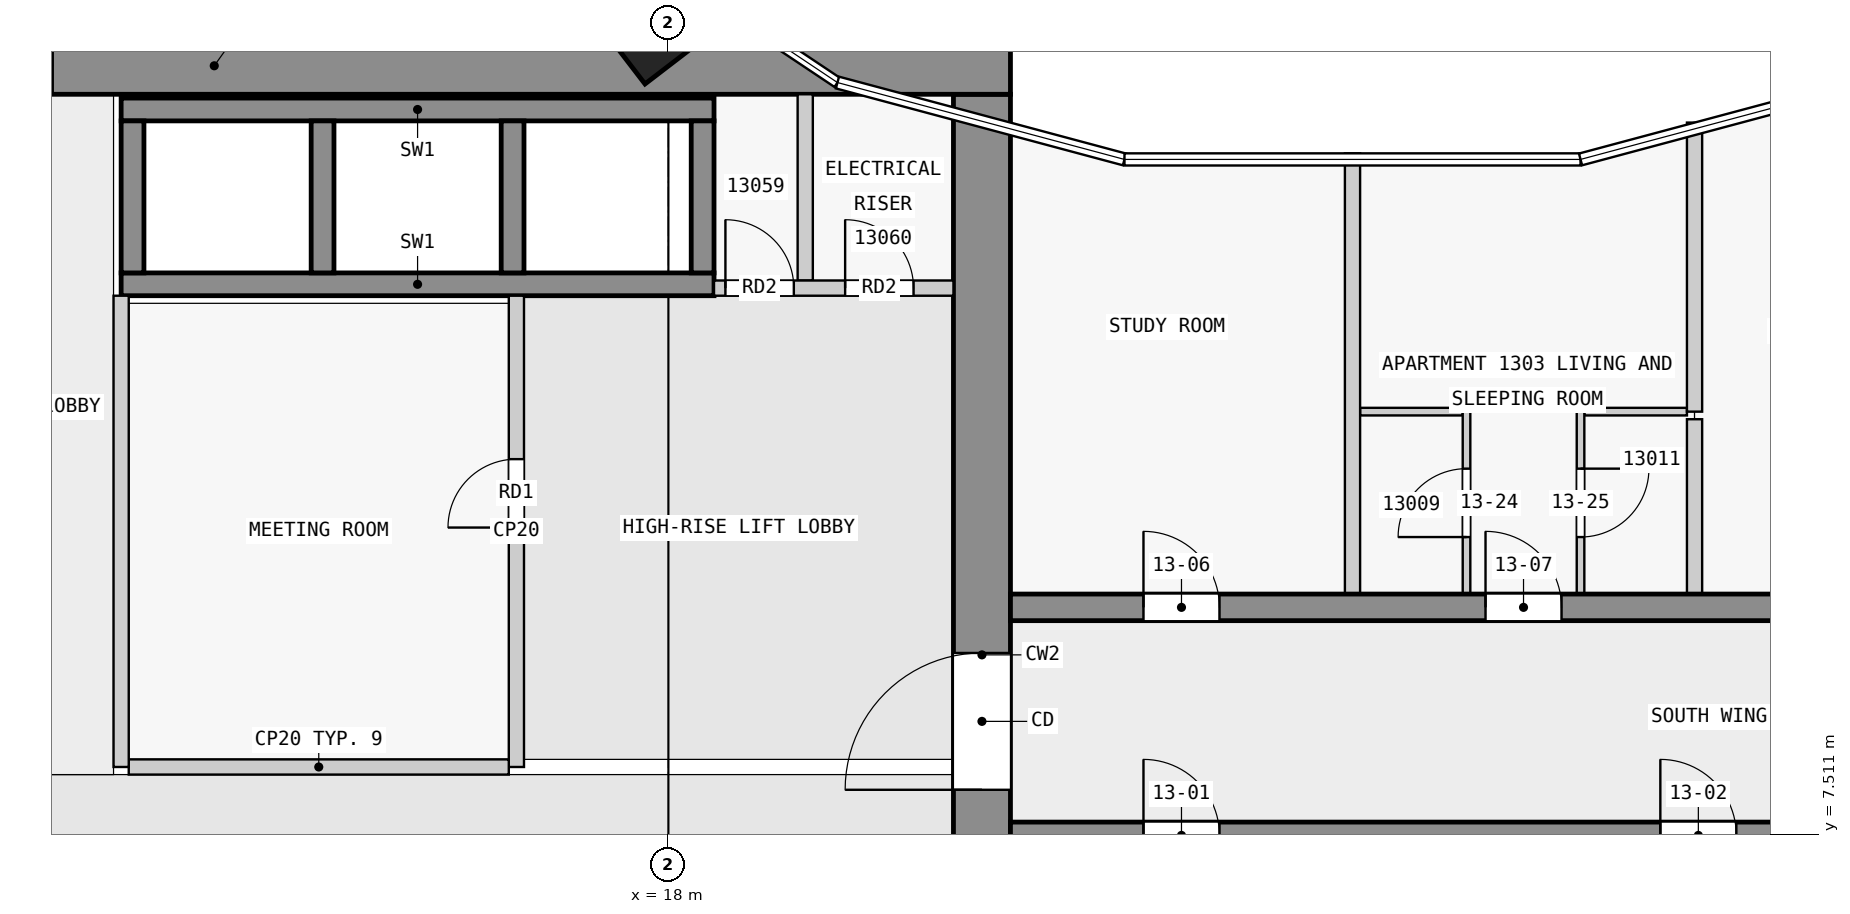
"""IFC4 building model, lengths in metres.
Left out: names, types, materials, properties, quantities, classifications, styles, units other than length and angle.
Written with IfcOpenShell. Run it as: python <this file> out.ifc"""

import sys

from ifc_helpers import new_model, si_unit, direction, frame, frame_2d, origin, origin_2d, place, context, subcontext, project, spatial, rectangle, extrude, element, fill, save


model = new_model("IFC4")
c1 = context("Model", 3, precision=1e-05, world=origin(), true_north=direction((0.0, 1.0)))
c2 = subcontext(c1, "Body", "Model", "MODEL_VIEW")
j1 = project(units=[si_unit("LENGTHUNIT", "METRE"), si_unit("PLANEANGLEUNIT", "RADIAN")], contexts=[c1])
p1 = place(None, origin())
s1 = spatial("IfcSite", under=j1, at=p1, CompositionType="ELEMENT")
p2 = place(p1, origin())
s2 = spatial("IfcBuilding", under=s1, at=p2, CompositionType="ELEMENT")
p3 = place(p2, frame((0.0, 0.0, 54.8)))
s3 = spatial("IfcBuildingStorey", under=s2, at=p3, CompositionType="ELEMENT", Elevation=54.8)
p4 = place(p3, frame((18.065, 18.05, 0.0), z_axis=(0.0, 0.0, 1.0), x_axis=(-0.608810846443, 0.793315418515, 0.0)))
e1 = element("IfcColumn", 1, at=p4, inside=s3, PredefinedType="COLUMN", context=c2, shape_type="SweptSolid", body=[
    extrude(rectangle(XDim=0.6, YDim=1.4, at=origin_2d()), origin(), (0.0, 0.0, 1.0), 3.5),
])
p5 = place(p3, frame((1.55, 17.625, 0.0), z_axis=(0.0, 0.0, 1.0), x_axis=(1.0, 0.0, 0.0)))
e2 = element("IfcWall", 2, at=p5, inside=s3, PredefinedType="SHEAR", context=c2, shape_type="SweptSolid", body=[
    extrude(rectangle(XDim=20.95, YDim=0.75, at=frame_2d((10.475, 0.0))), origin(), (0.0, 0.0, 1.0), 3.25),
])
p6 = place(p5, frame((6.55, 0.0, 0.0)))
e3 = element("IfcOpeningElement", 3, at=p6, cuts=e2, PredefinedType="OPENING", context=c2, shape_type="SweptSolid", body=[
    extrude(rectangle(XDim=1.8, YDim=2.1, at=frame_2d((0.9, 1.05))), frame((0.0, 0.385, 0.0), z_axis=(0.0, -1.0, 0.0), x_axis=(1.0, 0.0, 0.0)), (0.0, 0.0, 1.0), 0.77),
])
p7 = place(p3, frame((22.125, 2.5, 0.0), z_axis=(0.0, 0.0, 1.0), x_axis=(0.0, 1.0, 0.0)))
e4 = element("IfcWall", 4, at=p7, inside=s3, PredefinedType="SHEAR", context=c2, shape_type="SweptSolid", body=[
    extrude(rectangle(XDim=14.75, YDim=0.75, at=frame_2d((7.375, 0.0))), origin(), (0.0, 0.0, 1.0), 3.25),
])
p8 = place(p7, frame((5.6, 0.0, 0.0)))
e5 = element("IfcOpeningElement", 5, at=p8, cuts=e4, PredefinedType="OPENING", context=c2, shape_type="SweptSolid", body=[
    extrude(rectangle(XDim=1.8, YDim=2.1, at=frame_2d((0.9, 1.05))), frame((0.0, 0.385, 0.0), z_axis=(0.0, -1.0, 0.0), x_axis=(1.0, 0.0, 0.0)), (0.0, 0.0, 1.0), 0.77),
])
for number, where, z_axis, x_axis in (
    (6, (10.8, 17.05, 0.0), (0.0, 0.0, 1.0), (1.0, 0.0, 0.0)),
    (7, (10.8, 14.75, 0.0), (0.0, 0.0, 1.0), (1.0, 0.0, 0.0)),
):
    element("IfcWall", number, at=place(p3, frame(where, z_axis=z_axis, x_axis=x_axis)), inside=s3, PredefinedType="SHEAR", context=c2, shape_type="SweptSolid", body=[
        extrude(rectangle(XDim=7.8, YDim=0.3, at=frame_2d((3.9, 0.0))), origin(), (0.0, 0.0, 1.0), 3.25),
    ])
for number, where, z_axis, x_axis in (
    (8, (10.95, 14.9, 0.0), (0.0, 0.0, 1.0), (0.0, 1.0, 0.0)),
    (9, (13.45, 14.9, 0.0), (0.0, 0.0, 1.0), (0.0, 1.0, 0.0)),
    (10, (15.95, 14.9, 0.0), (0.0, 0.0, 1.0), (0.0, 1.0, 0.0)),
    (11, (18.45, 14.9, 0.0), (0.0, 0.0, 1.0), (0.0, 1.0, 0.0)),
):
    element("IfcWall", number, at=place(p3, frame(where, z_axis=z_axis, x_axis=x_axis)), inside=s3, PredefinedType="SHEAR", context=c2, shape_type="SweptSolid", body=[
        extrude(rectangle(XDim=2.0, YDim=0.3, at=frame_2d((1.0, 0.0))), origin(), (0.0, 0.0, 1.0), 3.25),
    ])
p9 = place(p3, frame((22.5, 7.5, 0.0), z_axis=(0.0, 0.0, 1.0), x_axis=(1.0, 0.0, 0.0)))
e12 = element("IfcWall", 12, at=p9, inside=s3, PredefinedType="SHEAR", context=c2, shape_type="SweptSolid", body=[
    extrude(rectangle(XDim=22.5, YDim=0.35, at=frame_2d((11.25, 0.0))), origin(), (0.0, 0.0, 1.0), 3.25),
])
p10 = place(p9, frame((1.75, 0.0, 0.0)))
e13 = element("IfcOpeningElement", 13, at=p10, cuts=e12, PredefinedType="OPENING", context=c2, shape_type="SweptSolid", body=[
    extrude(rectangle(XDim=1.0, YDim=2.1, at=frame_2d((0.5, 1.05))), frame((0.0, 0.185, 0.0), z_axis=(0.0, -1.0, 0.0), x_axis=(1.0, 0.0, 0.0)), (0.0, 0.0, 1.0), 0.37),
])
p11 = place(p9, frame((8.55, 0.0, 0.0)))
e14 = element("IfcOpeningElement", 14, at=p11, cuts=e12, PredefinedType="OPENING", context=c2, shape_type="SweptSolid", body=[
    extrude(rectangle(XDim=1.0, YDim=2.1, at=frame_2d((0.5, 1.05))), frame((0.0, 0.185, 0.0), z_axis=(0.0, -1.0, 0.0), x_axis=(1.0, 0.0, 0.0)), (0.0, 0.0, 1.0), 0.37),
])
p12 = place(p9, frame((15.25, 0.0, 0.0)))
e15 = element("IfcOpeningElement", 15, at=p12, cuts=e12, PredefinedType="OPENING", context=c2, shape_type="SweptSolid", body=[
    extrude(rectangle(XDim=1.0, YDim=2.1, at=frame_2d((0.5, 1.05))), frame((0.0, 0.185, 0.0), z_axis=(0.0, -1.0, 0.0), x_axis=(1.0, 0.0, 0.0)), (0.0, 0.0, 1.0), 0.37),
])
p13 = place(p9, frame((18.75, 0.0, 0.0)))
e16 = element("IfcOpeningElement", 16, at=p13, cuts=e12, PredefinedType="OPENING", context=c2, shape_type="SweptSolid", body=[
    extrude(rectangle(XDim=0.9, YDim=2.1, at=frame_2d((0.45, 1.05))), frame((0.0, 0.185, 0.0), z_axis=(0.0, -1.0, 0.0), x_axis=(1.0, 0.0, 0.0)), (0.0, 0.0, 1.0), 0.37),
])
p14 = place(p9, frame((20.95, 0.0, 0.0)))
e17 = element("IfcOpeningElement", 17, at=p14, cuts=e12, PredefinedType="OPENING", context=c2, shape_type="SweptSolid", body=[
    extrude(rectangle(XDim=1.0, YDim=2.1, at=frame_2d((0.5, 1.05))), frame((0.0, 0.185, 0.0), z_axis=(0.0, -1.0, 0.0), x_axis=(1.0, 0.0, 0.0)), (0.0, 0.0, 1.0), 0.37),
])
p15 = place(p3, frame((22.5, 10.5, 0.0), z_axis=(0.0, 0.0, 1.0), x_axis=(1.0, 0.0, 0.0)))
e18 = element("IfcWall", 18, at=p15, inside=s3, PredefinedType="SHEAR", context=c2, shape_type="SweptSolid", body=[
    extrude(rectangle(XDim=22.5, YDim=0.35, at=frame_2d((11.25, 0.0))), origin(), (0.0, 0.0, 1.0), 3.25),
])
p16 = place(p15, frame((1.75, 0.0, 0.0)))
e19 = element("IfcOpeningElement", 19, at=p16, cuts=e18, PredefinedType="OPENING", context=c2, shape_type="SweptSolid", body=[
    extrude(rectangle(XDim=1.0, YDim=2.1, at=frame_2d((0.5, 1.05))), frame((0.0, 0.185, 0.0), z_axis=(0.0, -1.0, 0.0), x_axis=(1.0, 0.0, 0.0)), (0.0, 0.0, 1.0), 0.37),
])
p17 = place(p15, frame((6.25, 0.0, 0.0)))
e20 = element("IfcOpeningElement", 20, at=p17, cuts=e18, PredefinedType="OPENING", context=c2, shape_type="SweptSolid", body=[
    extrude(rectangle(XDim=1.0, YDim=2.1, at=frame_2d((0.5, 1.05))), frame((0.0, 0.185, 0.0), z_axis=(0.0, -1.0, 0.0), x_axis=(1.0, 0.0, 0.0)), (0.0, 0.0, 1.0), 0.37),
])
p18 = place(p15, frame((10.75, 0.0, 0.0)))
e21 = element("IfcOpeningElement", 21, at=p18, cuts=e18, PredefinedType="OPENING", context=c2, shape_type="SweptSolid", body=[
    extrude(rectangle(XDim=1.0, YDim=2.1, at=frame_2d((0.5, 1.05))), frame((0.0, 0.185, 0.0), z_axis=(0.0, -1.0, 0.0), x_axis=(1.0, 0.0, 0.0)), (0.0, 0.0, 1.0), 0.37),
])
p19 = place(p15, frame((16.85, 0.0, 0.0)))
e22 = element("IfcOpeningElement", 22, at=p19, cuts=e18, PredefinedType="OPENING", context=c2, shape_type="SweptSolid", body=[
    extrude(rectangle(XDim=1.0, YDim=2.1, at=frame_2d((0.5, 1.05))), frame((0.0, 0.185, 0.0), z_axis=(0.0, -1.0, 0.0), x_axis=(1.0, 0.0, 0.0)), (0.0, 0.0, 1.0), 0.37),
])
p20 = place(p3, frame((10.8, 8.4, 0.0), z_axis=(0.0, 0.0, 1.0), x_axis=(0.0, 1.0, 0.0)))
e23 = element("IfcWall", 23, at=p20, inside=s3, PredefinedType="PARTITIONING", context=c2, shape_type="SweptSolid", body=[
    extrude(rectangle(XDim=6.2, YDim=0.2, at=frame_2d((3.1, 0.0))), origin(), (0.0, 0.0, 1.0), 3.25),
])
p21 = place(p3, frame((10.9, 8.4, 0.0), z_axis=(0.0, 0.0, 1.0), x_axis=(1.0, 0.0, 0.0)))
e24 = element("IfcWall", 24, at=p21, inside=s3, PredefinedType="PARTITIONING", context=c2, shape_type="SweptSolid", body=[
    extrude(rectangle(XDim=5.0, YDim=0.2, at=frame_2d((2.5, 0.0))), origin(), (0.0, 0.0, 1.0), 3.25),
])
p22 = place(p3, frame((16.0, 8.4, 0.0), z_axis=(0.0, 0.0, 1.0), x_axis=(0.0, 1.0, 0.0)))
e25 = element("IfcWall", 25, at=p22, inside=s3, PredefinedType="PARTITIONING", context=c2, shape_type="SweptSolid", body=[
    extrude(rectangle(XDim=6.2, YDim=0.2, at=frame_2d((3.1, 0.0))), origin(), (0.0, 0.0, 1.0), 3.25),
])
p23 = place(p22, frame((3.15, 0.0, 0.0)))
e26 = element("IfcOpeningElement", 26, at=p23, cuts=e25, PredefinedType="OPENING", context=c2, shape_type="SweptSolid", body=[
    extrude(rectangle(XDim=0.9, YDim=2.1, at=frame_2d((0.45, 1.05))), frame((0.0, 0.11, 0.0), z_axis=(0.0, -1.0, 0.0), x_axis=(1.0, 0.0, 0.0)), (0.0, 0.0, 1.0), 0.22),
])
p24 = place(p3, frame((18.6, 14.7, 0.0), z_axis=(0.0, 0.0, 1.0), x_axis=(1.0, 0.0, 0.0)))
e27 = element("IfcWall", 27, at=p24, inside=s3, PredefinedType="PARTITIONING", context=c2, shape_type="SweptSolid", body=[
    extrude(rectangle(XDim=3.15, YDim=0.2, at=frame_2d((1.575, 0.0))), origin(), (0.0, 0.0, 1.0), 3.25),
])
p25 = place(p24, frame((0.15, 0.0, 0.0)))
e28 = element("IfcOpeningElement", 28, at=p25, cuts=e27, PredefinedType="OPENING", context=c2, shape_type="SweptSolid", body=[
    extrude(rectangle(XDim=0.9, YDim=2.1, at=frame_2d((0.45, 1.05))), frame((0.0, 0.11, 0.0), z_axis=(0.0, -1.0, 0.0), x_axis=(1.0, 0.0, 0.0)), (0.0, 0.0, 1.0), 0.22),
])
p26 = place(p24, frame((1.725, 0.0, 0.0)))
e29 = element("IfcOpeningElement", 29, at=p26, cuts=e27, PredefinedType="OPENING", context=c2, shape_type="SweptSolid", body=[
    extrude(rectangle(XDim=0.9, YDim=2.1, at=frame_2d((0.45, 1.05))), frame((0.0, 0.11, 0.0), z_axis=(0.0, -1.0, 0.0), x_axis=(1.0, 0.0, 0.0)), (0.0, 0.0, 1.0), 0.22),
])
p27 = place(p3, frame((19.8, 14.8, 0.0), z_axis=(0.0, 0.0, 1.0), x_axis=(0.0, 1.0, 0.0)))
e30 = element("IfcWall", 30, at=p27, inside=s3, PredefinedType="PARTITIONING", context=c2, shape_type="SweptSolid", body=[
    extrude(rectangle(XDim=2.45, YDim=0.2, at=frame_2d((1.225, 0.0))), origin(), (0.0, 0.0, 1.0), 3.25),
])
for number, where, z_axis, x_axis in (
    (31, (28.45, 13.075, 0.0), (0.0, 0.0, 1.0), (-1.0, 0.0, 0.0)),
    (32, (31.4, 13.075, 0.0), (0.0, 0.0, 1.0), (-1.0, 0.0, 0.0)),
):
    element("IfcWall", number, at=place(p3, frame(where, z_axis=z_axis, x_axis=x_axis)), inside=s3, PredefinedType="PARTITIONING", context=c2, shape_type="SweptSolid", body=[
        extrude(rectangle(XDim=1.35, YDim=0.1, at=frame_2d((0.675, 0.0))), origin(), (0.0, 0.0, 1.0), 3.25),
    ])
p28 = place(p3, frame((27.0, 10.675, 0.0), z_axis=(0.0, 0.0, 1.0), x_axis=(0.0, 1.0, 0.0)))
e33 = element("IfcWall", 33, at=p28, inside=s3, PredefinedType="PARTITIONING", context=c2, shape_type="SweptSolid", body=[
    extrude(rectangle(XDim=5.798, YDim=0.2, at=frame_2d((2.899, 0.0))), origin(), (0.0, 0.0, 1.0), 3.25),
])
p29 = place(p3, frame((28.5, 10.675, 0.0), z_axis=(0.0, 0.0, 1.0), x_axis=(0.0, 1.0, 0.0)))
e34 = element("IfcWall", 34, at=p29, inside=s3, PredefinedType="PARTITIONING", context=c2, shape_type="SweptSolid", body=[
    extrude(rectangle(XDim=2.4, YDim=0.1, at=frame_2d((1.2, 0.0))), origin(), (0.0, 0.0, 1.0), 3.25),
])
p30 = place(p29, frame((0.75, 0.0, 0.0)))
e35 = element("IfcOpeningElement", 35, at=p30, cuts=e34, PredefinedType="OPENING", context=c2, shape_type="SweptSolid", body=[
    extrude(rectangle(XDim=0.9, YDim=2.1, at=frame_2d((0.45, 1.05))), frame((0.0, 0.06, 0.0), z_axis=(0.0, -1.0, 0.0), x_axis=(1.0, 0.0, 0.0)), (0.0, 0.0, 1.0), 0.12),
])
p31 = place(p3, frame((30.0, 13.075, 0.0), z_axis=(0.0, 0.0, 1.0), x_axis=(0.0, -1.0, 0.0)))
e36 = element("IfcWall", 36, at=p31, inside=s3, PredefinedType="PARTITIONING", context=c2, shape_type="SweptSolid", body=[
    extrude(rectangle(XDim=2.4, YDim=0.1, at=frame_2d((1.2, 0.0))), origin(), (0.0, 0.0, 1.0), 3.25),
])
p32 = place(p31, frame((0.75, 0.0, 0.0)))
e37 = element("IfcOpeningElement", 37, at=p32, cuts=e36, PredefinedType="OPENING", context=c2, shape_type="SweptSolid", body=[
    extrude(rectangle(XDim=0.9, YDim=2.1, at=frame_2d((0.45, 1.05))), frame((0.0, 0.06, 0.0), z_axis=(0.0, -1.0, 0.0), x_axis=(1.0, 0.0, 0.0)), (0.0, 0.0, 1.0), 0.12),
])
p33 = place(p3, frame((31.5, 16.878, 0.0), z_axis=(0.0, 0.0, 1.0), x_axis=(0.0, -1.0, 0.0)))
e38 = element("IfcWall", 38, at=p33, inside=s3, PredefinedType="PARTITIONING", context=c2, shape_type="SweptSolid", body=[
    extrude(rectangle(XDim=3.803, YDim=0.2, at=frame_2d((1.901, 0.0))), origin(), (0.0, 0.0, 1.0), 3.25),
])
p34 = place(p3, frame((31.5, 10.675, 0.0), z_axis=(0.0, 0.0, 1.0), x_axis=(0.0, 1.0, 0.0)))
e39 = element("IfcWall", 39, at=p34, inside=s3, PredefinedType="PARTITIONING", context=c2, shape_type="SweptSolid", body=[
    extrude(rectangle(XDim=2.3, YDim=0.2, at=frame_2d((1.15, 0.0))), origin(), (0.0, 0.0, 1.0), 3.25),
])
p35 = place(p23, origin())
e40 = element("IfcDoor", 40, at=p35, inside=s3, OperationType="SINGLE_SWING_LEFT", PredefinedType="DOOR", context=c2, shape_type="SweptSolid", body=[
    extrude(rectangle(XDim=0.9, YDim=2.1, at=frame_2d((0.45, 1.05))), frame((0.0, 0.025, 0.0), z_axis=(0.0, -1.0, 0.0), x_axis=(1.0, 0.0, 0.0)), (0.0, 0.0, 1.0), 0.05),
])
fill(e26, e40)
p36 = place(p8, origin())
e41 = element("IfcDoor", 41, at=p36, inside=s3, OperationType="DOUBLE_DOOR_SINGLE_SWING", PredefinedType="DOOR", context=c2, shape_type="SweptSolid", body=[
    extrude(rectangle(XDim=1.8, YDim=2.1, at=frame_2d((0.9, 1.05))), frame((0.0, 0.025, 0.0), z_axis=(0.0, -1.0, 0.0), x_axis=(1.0, 0.0, 0.0)), (0.0, 0.0, 1.0), 0.05),
])
fill(e5, e41)
p37 = place(p6, origin())
e42 = element("IfcDoor", 42, at=p37, inside=s3, OperationType="DOUBLE_DOOR_SINGLE_SWING", PredefinedType="DOOR", context=c2, shape_type="SweptSolid", body=[
    extrude(rectangle(XDim=1.8, YDim=2.1, at=frame_2d((0.9, 1.05))), frame((0.0, 0.025, 0.0), z_axis=(0.0, -1.0, 0.0), x_axis=(1.0, 0.0, 0.0)), (0.0, 0.0, 1.0), 0.05),
])
fill(e3, e42)
p38 = place(p25, origin())
e43 = element("IfcDoor", 43, at=p38, inside=s3, OperationType="SINGLE_SWING_LEFT", PredefinedType="DOOR", context=c2, shape_type="SweptSolid", body=[
    extrude(rectangle(XDim=0.9, YDim=2.1, at=frame_2d((0.45, 1.05))), frame((0.0, 0.025, 0.0), z_axis=(0.0, -1.0, 0.0), x_axis=(1.0, 0.0, 0.0)), (0.0, 0.0, 1.0), 0.05),
])
fill(e28, e43)
p39 = place(p26, origin())
e44 = element("IfcDoor", 44, at=p39, inside=s3, OperationType="SINGLE_SWING_LEFT", PredefinedType="DOOR", context=c2, shape_type="SweptSolid", body=[
    extrude(rectangle(XDim=0.9, YDim=2.1, at=frame_2d((0.45, 1.05))), frame((0.0, 0.025, 0.0), z_axis=(0.0, -1.0, 0.0), x_axis=(1.0, 0.0, 0.0)), (0.0, 0.0, 1.0), 0.05),
])
fill(e29, e44)
p40 = place(p10, origin())
e45 = element("IfcDoor", 45, at=p40, inside=s3, OperationType="SINGLE_SWING_LEFT", PredefinedType="DOOR", context=c2, shape_type="SweptSolid", body=[
    extrude(rectangle(XDim=1.0, YDim=2.1, at=frame_2d((0.5, 1.05))), frame((0.0, 0.025, 0.0), z_axis=(0.0, -1.0, 0.0), x_axis=(1.0, 0.0, 0.0)), (0.0, 0.0, 1.0), 0.05),
])
fill(e13, e45)
p41 = place(p11, origin())
e46 = element("IfcDoor", 46, at=p41, inside=s3, OperationType="SINGLE_SWING_LEFT", PredefinedType="DOOR", context=c2, shape_type="SweptSolid", body=[
    extrude(rectangle(XDim=1.0, YDim=2.1, at=frame_2d((0.5, 1.05))), frame((0.0, 0.025, 0.0), z_axis=(0.0, -1.0, 0.0), x_axis=(1.0, 0.0, 0.0)), (0.0, 0.0, 1.0), 0.05),
])
fill(e14, e46)
p42 = place(p16, origin())
e47 = element("IfcDoor", 47, at=p42, inside=s3, OperationType="SINGLE_SWING_LEFT", PredefinedType="DOOR", context=c2, shape_type="SweptSolid", body=[
    extrude(rectangle(XDim=1.0, YDim=2.1, at=frame_2d((0.5, 1.05))), frame((0.0, 0.025, 0.0), z_axis=(0.0, -1.0, 0.0), x_axis=(1.0, 0.0, 0.0)), (0.0, 0.0, 1.0), 0.05),
])
fill(e19, e47)
p43 = place(p17, origin())
e48 = element("IfcDoor", 48, at=p43, inside=s3, OperationType="SINGLE_SWING_LEFT", PredefinedType="DOOR", context=c2, shape_type="SweptSolid", body=[
    extrude(rectangle(XDim=1.0, YDim=2.1, at=frame_2d((0.5, 1.05))), frame((0.0, 0.025, 0.0), z_axis=(0.0, -1.0, 0.0), x_axis=(1.0, 0.0, 0.0)), (0.0, 0.0, 1.0), 0.05),
])
fill(e20, e48)
p44 = place(p30, origin())
e49 = element("IfcDoor", 49, at=p44, inside=s3, OperationType="SINGLE_SWING_RIGHT", PredefinedType="DOOR", context=c2, shape_type="SweptSolid", body=[
    extrude(rectangle(XDim=0.9, YDim=2.1, at=frame_2d((0.45, 1.05))), frame((0.0, 0.025, 0.0), z_axis=(0.0, -1.0, 0.0), x_axis=(1.0, 0.0, 0.0)), (0.0, 0.0, 1.0), 0.05),
])
fill(e35, e49)
p45 = place(p32, origin())
e50 = element("IfcDoor", 50, at=p45, inside=s3, OperationType="SINGLE_SWING_RIGHT", PredefinedType="DOOR", context=c2, shape_type="SweptSolid", body=[
    extrude(rectangle(XDim=0.9, YDim=2.1, at=frame_2d((0.45, 1.05))), frame((0.0, 0.025, 0.0), z_axis=(0.0, -1.0, 0.0), x_axis=(1.0, 0.0, 0.0)), (0.0, 0.0, 1.0), 0.05),
])
fill(e37, e50)
save(model, sys.argv[1])
